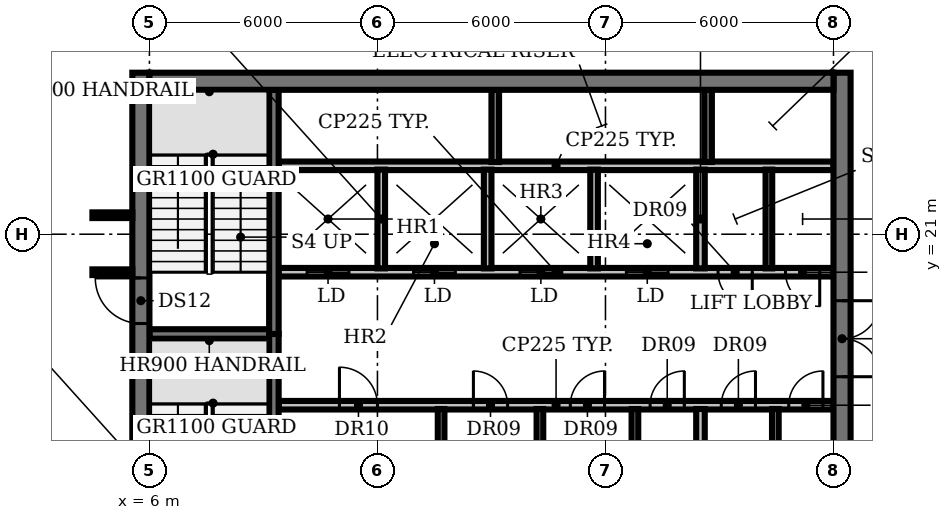
"""IFC4 building model, lengths in metres.
Left out: names, types, materials, properties, quantities, classifications, styles, units other than length and angle.
Written with IfcOpenShell. Run it as: python <this file> out.ifc"""

import sys

from ifc_helpers import new_model, si_unit, direction, frame, frame_2d, origin, place, context, subcontext, project, spatial, rectangle, extrude, element, fill, save


model = new_model("IFC4")
c1 = context("Model", 3, precision=1e-05, world=origin(), true_north=direction((0.0, 1.0)))
c2 = subcontext(c1, "Body", "Model", "MODEL_VIEW")
j1 = project(units=[si_unit("LENGTHUNIT", "METRE"), si_unit("PLANEANGLEUNIT", "RADIAN")], contexts=[c1])
p1 = place(None, origin())
s1 = spatial("IfcSite", under=j1, at=p1, CompositionType="ELEMENT")
p2 = place(p1, origin())
s2 = spatial("IfcBuilding", under=s1, at=p2, CompositionType="ELEMENT")
p3 = place(p2, frame((0.0, 0.0, 205.4)))
s3 = spatial("IfcBuildingStorey", under=s2, at=p3, CompositionType="ELEMENT", Elevation=205.4)
p4 = place(p3, frame((9.4, 16.5, 0.0), z_axis=(0.0, 0.0, 1.0), x_axis=(1.0, 0.0, 0.0)))
e1 = element("IfcWall", 1, at=p4, inside=s3, PredefinedType="PARTITIONING", context=c2, shape_type="SweptSolid", body=[
    extrude(rectangle(XDim=14.6, YDim=0.225, at=frame_2d((7.3, 0.0))), origin(), (0.0, 0.0, 1.0), 3.85),
])
p5 = place(p4, frame((1.6, 0.0, 0.0)))
e2 = element("IfcOpeningElement", 2, at=p5, cuts=e1, PredefinedType="OPENING", context=c2, shape_type="SweptSolid", body=[
    extrude(rectangle(XDim=1.0, YDim=2.1, at=frame_2d((0.5, 1.05))), frame((0.0, 0.123, 0.0), z_axis=(0.0, -1.0, 0.0), x_axis=(1.0, 0.0, 0.0)), (0.0, 0.0, 1.0), 0.245),
])
p6 = place(p4, frame((5.125, 0.0, 0.0)))
e3 = element("IfcOpeningElement", 3, at=p6, cuts=e1, PredefinedType="OPENING", context=c2, shape_type="SweptSolid", body=[
    extrude(rectangle(XDim=0.9, YDim=2.1, at=frame_2d((0.45, 1.05))), frame((0.0, 0.123, 0.0), z_axis=(0.0, -1.0, 0.0), x_axis=(1.0, 0.0, 0.0)), (0.0, 0.0, 1.0), 0.245),
])
p7 = place(p4, frame((7.675, 0.0, 0.0)))
e4 = element("IfcOpeningElement", 4, at=p7, cuts=e1, PredefinedType="OPENING", context=c2, shape_type="SweptSolid", body=[
    extrude(rectangle(XDim=0.9, YDim=2.1, at=frame_2d((0.45, 1.05))), frame((0.0, 0.123, 0.0), z_axis=(0.0, -1.0, 0.0), x_axis=(1.0, 0.0, 0.0)), (0.0, 0.0, 1.0), 0.245),
])
p8 = place(p4, frame((9.775, 0.0, 0.0)))
e5 = element("IfcOpeningElement", 5, at=p8, cuts=e1, PredefinedType="OPENING", context=c2, shape_type="SweptSolid", body=[
    extrude(rectangle(XDim=0.9, YDim=2.1, at=frame_2d((0.45, 1.05))), frame((0.0, 0.123, 0.0), z_axis=(0.0, -1.0, 0.0), x_axis=(1.0, 0.0, 0.0)), (0.0, 0.0, 1.0), 0.245),
])
p9 = place(p4, frame((11.647, 0.0, 0.0)))
e6 = element("IfcOpeningElement", 6, at=p9, cuts=e1, PredefinedType="OPENING", context=c2, shape_type="SweptSolid", body=[
    extrude(rectangle(XDim=0.9, YDim=2.1, at=frame_2d((0.45, 1.05))), frame((0.0, 0.123, 0.0), z_axis=(0.0, -1.0, 0.0), x_axis=(1.0, 0.0, 0.0)), (0.0, 0.0, 1.0), 0.245),
])
p10 = place(p4, frame((13.423, 0.0, 0.0)))
e7 = element("IfcOpeningElement", 7, at=p10, cuts=e1, PredefinedType="OPENING", context=c2, shape_type="SweptSolid", body=[
    extrude(rectangle(XDim=0.9, YDim=2.1, at=frame_2d((0.45, 1.05))), frame((0.0, 0.123, 0.0), z_axis=(0.0, -1.0, 0.0), x_axis=(1.0, 0.0, 0.0)), (0.0, 0.0, 1.0), 0.245),
])
p11 = place(p3, frame((6.0, 18.375, 0.0), z_axis=(0.0, 0.0, 1.0), x_axis=(1.0, 0.0, 0.0)))
e8 = element("IfcWall", 8, at=p11, inside=s3, PredefinedType="SHEAR", context=c2, shape_type="SweptSolid", body=[
    extrude(rectangle(XDim=3.15, YDim=0.25, at=frame_2d((1.575, 0.0))), origin(), (0.0, 0.0, 1.0), 3.85),
])
p12 = place(p3, frame((24.0, 20.0, 0.0), z_axis=(0.0, 0.0, 1.0), x_axis=(-1.0, 0.0, 0.0)))
e9 = element("IfcWall", 9, at=p12, inside=s3, PredefinedType="PARTITIONING", context=c2, shape_type="SweptSolid", body=[
    extrude(rectangle(XDim=14.6, YDim=0.225, at=frame_2d((7.3, 0.0))), origin(), (0.0, 0.0, 1.0), 3.85),
])
p13 = place(p12, frame((12.75, 0.0, 0.0)))
e10 = element("IfcOpeningElement", 10, at=p13, cuts=e9, PredefinedType="OPENING", context=c2, shape_type="SweptSolid", body=[
    extrude(rectangle(XDim=1.1, YDim=2.1, at=frame_2d((0.55, 1.05))), frame((0.0, 0.123, 0.0), z_axis=(0.0, -1.0, 0.0), x_axis=(1.0, 0.0, 0.0)), (0.0, 0.0, 1.0), 0.245),
])
p14 = place(p12, frame((9.95, 0.0, 0.0)))
e11 = element("IfcOpeningElement", 11, at=p14, cuts=e9, PredefinedType="OPENING", context=c2, shape_type="SweptSolid", body=[
    extrude(rectangle(XDim=1.1, YDim=2.1, at=frame_2d((0.55, 1.05))), frame((0.0, 0.123, 0.0), z_axis=(0.0, -1.0, 0.0), x_axis=(1.0, 0.0, 0.0)), (0.0, 0.0, 1.0), 0.245),
])
p15 = place(p12, frame((7.15, 0.0, 0.0)))
e12 = element("IfcOpeningElement", 12, at=p15, cuts=e9, PredefinedType="OPENING", context=c2, shape_type="SweptSolid", body=[
    extrude(rectangle(XDim=1.1, YDim=2.1, at=frame_2d((0.55, 1.05))), frame((0.0, 0.123, 0.0), z_axis=(0.0, -1.0, 0.0), x_axis=(1.0, 0.0, 0.0)), (0.0, 0.0, 1.0), 0.245),
])
p16 = place(p12, frame((4.35, 0.0, 0.0)))
e13 = element("IfcOpeningElement", 13, at=p16, cuts=e9, PredefinedType="OPENING", context=c2, shape_type="SweptSolid", body=[
    extrude(rectangle(XDim=1.1, YDim=2.1, at=frame_2d((0.55, 1.05))), frame((0.0, 0.123, 0.0), z_axis=(0.0, -1.0, 0.0), x_axis=(1.0, 0.0, 0.0)), (0.0, 0.0, 1.0), 0.245),
])
p17 = place(p12, frame((2.137, 0.0, 0.0)))
e14 = element("IfcOpeningElement", 14, at=p17, cuts=e9, PredefinedType="OPENING", context=c2, shape_type="SweptSolid", body=[
    extrude(rectangle(XDim=0.9, YDim=2.1, at=frame_2d((0.45, 1.05))), frame((0.0, 0.123, 0.0), z_axis=(0.0, -1.0, 0.0), x_axis=(1.0, 0.0, 0.0)), (0.0, 0.0, 1.0), 0.245),
])
p18 = place(p12, frame((0.363, 0.0, 0.0)))
e15 = element("IfcOpeningElement", 15, at=p18, cuts=e9, PredefinedType="OPENING", context=c2, shape_type="SweptSolid", body=[
    extrude(rectangle(XDim=0.9, YDim=2.1, at=frame_2d((0.45, 1.05))), frame((0.0, 0.123, 0.0), z_axis=(0.0, -1.0, 0.0), x_axis=(1.0, 0.0, 0.0)), (0.0, 0.0, 1.0), 0.245),
])
p19 = place(p3, frame((9.4, 22.8, 0.0), z_axis=(0.0, 0.0, 1.0), x_axis=(1.0, 0.0, 0.0)))
e16 = element("IfcWall", 16, at=p19, inside=s3, PredefinedType="PARTITIONING", context=c2, shape_type="SweptSolid", body=[
    extrude(rectangle(XDim=14.6, YDim=0.225, at=frame_2d((7.3, 0.0))), origin(), (0.0, 0.0, 1.0), 3.85),
])
p20 = place(p3, frame((9.275, 18.375, 0.0), z_axis=(0.0, 0.0, 1.0), x_axis=(0.0, -1.0, 0.0)))
e17 = element("IfcWall", 17, at=p20, inside=s3, PredefinedType="SHEAR", context=c2, shape_type="SweptSolid", body=[
    extrude(rectangle(XDim=6.55, YDim=0.25, at=frame_2d((3.275, 0.0))), origin(), (0.0, 0.0, 1.0), 3.85),
])
p21 = place(p20, frame((5.075, 0.0, 0.0)))
e18 = element("IfcOpeningElement", 18, at=p21, cuts=e17, PredefinedType="OPENING", context=c2, shape_type="SweptSolid", body=[
    extrude(rectangle(XDim=1.0, YDim=2.1, at=frame_2d((0.5, 1.05))), frame((0.0, 0.135, 0.0), z_axis=(0.0, -1.0, 0.0), x_axis=(1.0, 0.0, 0.0)), (0.0, 0.0, 1.0), 0.27),
])
p22 = place(p3, frame((9.275, 18.375, 0.0), z_axis=(0.0, 0.0, 1.0), x_axis=(0.0, 1.0, 0.0)))
e19 = element("IfcWall", 19, at=p22, inside=s3, PredefinedType="SHEAR", context=c2, shape_type="SweptSolid", body=[
    extrude(rectangle(XDim=6.425, YDim=0.25, at=frame_2d((3.212, 0.0))), origin(), (0.0, 0.0, 1.0), 3.85),
])
p23 = place(p3, frame((12.1, 20.1, 0.0), z_axis=(0.0, 0.0, 1.0), x_axis=(0.0, 1.0, 0.0)))
e20 = element("IfcWall", 20, at=p23, inside=s3, PredefinedType="SOLIDWALL", context=c2, shape_type="SweptSolid", body=[
    extrude(rectangle(XDim=2.6, YDim=0.2, at=frame_2d((1.3, 0.0))), origin(), (0.0, 0.0, 1.0), 3.85),
])
p24 = place(p3, frame((13.675, 13.8, 0.0), z_axis=(0.0, 0.0, 1.0), x_axis=(0.0, 1.0, 0.0)))
e21 = element("IfcWall", 21, at=p24, inside=s3, PredefinedType="PARTITIONING", context=c2, shape_type="SweptSolid", body=[
    extrude(rectangle(XDim=2.6, YDim=0.175, at=frame_2d((1.3, 0.0))), origin(), (0.0, 0.0, 1.0), 3.85),
])
p25 = place(p3, frame((14.9, 20.1, 0.0), z_axis=(0.0, 0.0, 1.0), x_axis=(0.0, 1.0, 0.0)))
e22 = element("IfcWall", 22, at=p25, inside=s3, PredefinedType="SOLIDWALL", context=c2, shape_type="SweptSolid", body=[
    extrude(rectangle(XDim=2.6, YDim=0.2, at=frame_2d((1.3, 0.0))), origin(), (0.0, 0.0, 1.0), 3.85),
])
p26 = place(p3, frame((15.1, 22.9, 0.0), z_axis=(0.0, 0.0, 1.0), x_axis=(0.0, 1.0, 0.0)))
e23 = element("IfcWall", 23, at=p26, inside=s3, PredefinedType="SHEAR", context=c2, shape_type="SweptSolid", body=[
    extrude(rectangle(XDim=1.9, YDim=0.2, at=frame_2d((0.95, 0.0))), origin(), (0.0, 0.0, 1.0), 3.85),
])
p27 = place(p3, frame((16.275, 13.8, 0.0), z_axis=(0.0, 0.0, 1.0), x_axis=(0.0, 1.0, 0.0)))
e24 = element("IfcWall", 24, at=p27, inside=s3, PredefinedType="PARTITIONING", context=c2, shape_type="SweptSolid", body=[
    extrude(rectangle(XDim=2.6, YDim=0.175, at=frame_2d((1.3, 0.0))), origin(), (0.0, 0.0, 1.0), 3.85),
])
p28 = place(p3, frame((17.7, 20.1, 0.0), z_axis=(0.0, 0.0, 1.0), x_axis=(0.0, 1.0, 0.0)))
e25 = element("IfcWall", 25, at=p28, inside=s3, PredefinedType="SOLIDWALL", context=c2, shape_type="SweptSolid", body=[
    extrude(rectangle(XDim=2.6, YDim=0.2, at=frame_2d((1.3, 0.0))), origin(), (0.0, 0.0, 1.0), 3.85),
])
p29 = place(p3, frame((18.775, 13.8, 0.0), z_axis=(0.0, 0.0, 1.0), x_axis=(0.0, 1.0, 0.0)))
e26 = element("IfcWall", 26, at=p29, inside=s3, PredefinedType="PARTITIONING", context=c2, shape_type="SweptSolid", body=[
    extrude(rectangle(XDim=2.6, YDim=0.175, at=frame_2d((1.3, 0.0))), origin(), (0.0, 0.0, 1.0), 3.85),
])
for number, where, z_axis, x_axis in (
    (27, (20.5, 13.8, 0.0), (0.0, 0.0, 1.0), (0.0, 1.0, 0.0)),
    (28, (20.5, 20.1, 0.0), (0.0, 0.0, 1.0), (0.0, 1.0, 0.0)),
):
    element("IfcWall", number, at=place(p3, frame(where, z_axis=z_axis, x_axis=x_axis)), inside=s3, PredefinedType="PARTITIONING", context=c2, shape_type="SweptSolid", body=[
        extrude(rectangle(XDim=2.6, YDim=0.225, at=frame_2d((1.3, 0.0))), origin(), (0.0, 0.0, 1.0), 3.85),
    ])
p30 = place(p3, frame((20.7, 22.9, 0.0), z_axis=(0.0, 0.0, 1.0), x_axis=(0.0, 1.0, 0.0)))
e29 = element("IfcWall", 29, at=p30, inside=s3, PredefinedType="SHEAR", context=c2, shape_type="SweptSolid", body=[
    extrude(rectangle(XDim=1.9, YDim=0.2, at=frame_2d((0.95, 0.0))), origin(), (0.0, 0.0, 1.0), 3.85),
])
for number, where, z_axis, x_axis in (
    (30, (22.3, 20.1, 0.0), (0.0, 0.0, 1.0), (0.0, 1.0, 0.0)),
    (31, (22.47, 13.8, 0.0), (0.0, 0.0, 1.0), (0.0, 1.0, 0.0)),
):
    element("IfcWall", number, at=place(p3, frame(where, z_axis=z_axis, x_axis=x_axis)), inside=s3, PredefinedType="PARTITIONING", context=c2, shape_type="SweptSolid", body=[
        extrude(rectangle(XDim=2.6, YDim=0.175, at=frame_2d((1.3, 0.0))), origin(), (0.0, 0.0, 1.0), 3.85),
    ])
p31 = place(p3, frame((5.775, 4.47, 0.0), z_axis=(0.0, 0.0, 1.0), x_axis=(0.0, 1.0, 0.0)))
e32 = element("IfcWall", 32, at=p31, inside=s3, PredefinedType="SHEAR", context=c2, shape_type="SweptSolid", body=[
    extrude(rectangle(XDim=20.78, YDim=0.45, at=frame_2d((10.39, 0.0))), origin(), (0.0, 0.0, 1.0), 3.85),
])
p32 = place(p31, frame((1.18, 0.0, 0.0)))
e33 = element("IfcOpeningElement", 33, at=p32, cuts=e32, PredefinedType="OPENING", context=c2, shape_type="SweptSolid", body=[
    extrude(rectangle(XDim=1.5, YDim=2.1, at=frame_2d((0.75, 1.05))), frame((0.0, 0.235, 0.0), z_axis=(0.0, -1.0, 0.0), x_axis=(1.0, 0.0, 0.0)), (0.0, 0.0, 1.0), 0.47),
])
p33 = place(p31, frame((7.63, 0.0, 0.0)))
e34 = element("IfcOpeningElement", 34, at=p33, cuts=e32, PredefinedType="OPENING", context=c2, shape_type="SweptSolid", body=[
    extrude(rectangle(XDim=1.2, YDim=2.1, at=frame_2d((0.6, 1.05))), frame((0.0, 0.235, 0.0), z_axis=(0.0, -1.0, 0.0), x_axis=(1.0, 0.0, 0.0)), (0.0, 0.0, 1.0), 0.47),
])
p34 = place(p31, frame((14.18, 0.0, 0.0)))
e35 = element("IfcOpeningElement", 35, at=p34, cuts=e32, PredefinedType="OPENING", context=c2, shape_type="SweptSolid", body=[
    extrude(rectangle(XDim=1.2, YDim=2.1, at=frame_2d((0.6, 1.05))), frame((0.0, 0.235, 0.0), z_axis=(0.0, -1.0, 0.0), x_axis=(1.0, 0.0, 0.0)), (0.0, 0.0, 1.0), 0.47),
])
p35 = place(p3, frame((24.225, 25.25, 0.0), z_axis=(0.0, 0.0, 1.0), x_axis=(0.0, -1.0, 0.0)))
e36 = element("IfcWall", 36, at=p35, inside=s3, PredefinedType="SHEAR", context=c2, shape_type="SweptSolid", body=[
    extrude(rectangle(XDim=20.78, YDim=0.45, at=frame_2d((10.39, 0.0))), origin(), (0.0, 0.0, 1.0), 3.85),
])
p36 = place(p35, frame((18.1, 0.0, 0.0)))
e37 = element("IfcOpeningElement", 37, at=p36, cuts=e36, PredefinedType="OPENING", context=c2, shape_type="SweptSolid", body=[
    extrude(rectangle(XDim=1.5, YDim=2.1, at=frame_2d((0.75, 1.05))), frame((0.0, 0.235, 0.0), z_axis=(0.0, -1.0, 0.0), x_axis=(1.0, 0.0, 0.0)), (0.0, 0.0, 1.0), 0.47),
])
p37 = place(p35, frame((12.0, 0.0, 0.0)))
e38 = element("IfcOpeningElement", 38, at=p37, cuts=e36, PredefinedType="OPENING", context=c2, shape_type="SweptSolid", body=[
    extrude(rectangle(XDim=0.9, YDim=2.1, at=frame_2d((0.45, 1.05))), frame((0.0, 0.235, 0.0), z_axis=(0.0, -1.0, 0.0), x_axis=(1.0, 0.0, 0.0)), (0.0, 0.0, 1.0), 0.47),
])
p38 = place(p35, frame((6.0, 0.0, 0.0)))
e39 = element("IfcOpeningElement", 39, at=p38, cuts=e36, PredefinedType="OPENING", context=c2, shape_type="SweptSolid", body=[
    extrude(rectangle(XDim=2.0, YDim=2.1, at=frame_2d((1.0, 1.05))), frame((0.0, 0.235, 0.0), z_axis=(0.0, -1.0, 0.0), x_axis=(1.0, 0.0, 0.0)), (0.0, 0.0, 1.0), 0.47),
])
p39 = place(p3, frame((6.0, 25.025, 0.0), z_axis=(0.0, 0.0, 1.0), x_axis=(1.0, 0.0, 0.0)))
e40 = element("IfcWall", 40, at=p39, inside=s3, PredefinedType="SHEAR", context=c2, shape_type="SweptSolid", body=[
    extrude(rectangle(XDim=18.0, YDim=0.45, at=frame_2d((9.0, 0.0))), origin(), (0.0, 0.0, 1.0), 3.85),
])
for number, where, z_axis, x_axis in (
    (41, (4.5, 20.0, 0.0), (0.0, 0.0, 1.0), (1.0, 0.0, 0.0)),
    (42, (4.5, 21.5, 0.0), (0.0, 0.0, 1.0), (1.0, 0.0, 0.0)),
):
    element("IfcWall", number, at=place(p3, frame(where, z_axis=z_axis, x_axis=x_axis)), inside=s3, PredefinedType="PARTITIONING", context=c2, shape_type="SweptSolid", body=[
        extrude(rectangle(XDim=1.05, YDim=0.15, at=frame_2d((0.525, 0.0))), origin(), (0.0, 0.0, 1.0), 2.88),
    ])
p40 = place(p5, origin())
e43 = element("IfcDoor", 43, at=p40, inside=s3, OperationType="SINGLE_SWING_LEFT", PredefinedType="DOOR", context=c2, shape_type="SweptSolid", body=[
    extrude(rectangle(XDim=1.0, YDim=2.1, at=frame_2d((0.5, 1.05))), frame((0.0, 0.025, 0.0), z_axis=(0.0, -1.0, 0.0), x_axis=(1.0, 0.0, 0.0)), (0.0, 0.0, 1.0), 0.05),
])
fill(e2, e43)
p41 = place(p6, origin())
e44 = element("IfcDoor", 44, at=p41, inside=s3, OperationType="SINGLE_SWING_LEFT", PredefinedType="DOOR", context=c2, shape_type="SweptSolid", body=[
    extrude(rectangle(XDim=0.9, YDim=2.1, at=frame_2d((0.45, 1.05))), frame((0.0, 0.025, 0.0), z_axis=(0.0, -1.0, 0.0), x_axis=(1.0, 0.0, 0.0)), (0.0, 0.0, 1.0), 0.05),
])
fill(e3, e44)
p42 = place(p7, origin())
e45 = element("IfcDoor", 45, at=p42, inside=s3, OperationType="SINGLE_SWING_RIGHT", PredefinedType="DOOR", context=c2, shape_type="SweptSolid", body=[
    extrude(rectangle(XDim=0.9, YDim=2.1, at=frame_2d((0.45, 1.05))), frame((0.0, 0.025, 0.0), z_axis=(0.0, -1.0, 0.0), x_axis=(1.0, 0.0, 0.0)), (0.0, 0.0, 1.0), 0.05),
])
fill(e4, e45)
p43 = place(p8, origin())
e46 = element("IfcDoor", 46, at=p43, inside=s3, OperationType="SINGLE_SWING_RIGHT", PredefinedType="DOOR", context=c2, shape_type="SweptSolid", body=[
    extrude(rectangle(XDim=0.9, YDim=2.1, at=frame_2d((0.45, 1.05))), frame((0.0, 0.025, 0.0), z_axis=(0.0, -1.0, 0.0), x_axis=(1.0, 0.0, 0.0)), (0.0, 0.0, 1.0), 0.05),
])
fill(e5, e46)
p44 = place(p9, origin())
e47 = element("IfcDoor", 47, at=p44, inside=s3, OperationType="SINGLE_SWING_RIGHT", PredefinedType="DOOR", context=c2, shape_type="SweptSolid", body=[
    extrude(rectangle(XDim=0.9, YDim=2.1, at=frame_2d((0.45, 1.05))), frame((0.0, 0.025, 0.0), z_axis=(0.0, -1.0, 0.0), x_axis=(1.0, 0.0, 0.0)), (0.0, 0.0, 1.0), 0.05),
])
fill(e6, e47)
p45 = place(p10, origin())
e48 = element("IfcDoor", 48, at=p45, inside=s3, OperationType="SINGLE_SWING_RIGHT", PredefinedType="DOOR", context=c2, shape_type="SweptSolid", body=[
    extrude(rectangle(XDim=0.9, YDim=2.1, at=frame_2d((0.45, 1.05))), frame((0.0, 0.025, 0.0), z_axis=(0.0, -1.0, 0.0), x_axis=(1.0, 0.0, 0.0)), (0.0, 0.0, 1.0), 0.05),
])
fill(e7, e48)
p46 = place(p13, origin())
e49 = element("IfcDoor", 49, at=p46, inside=s3, OperationType="DOUBLE_DOOR_SLIDING", PredefinedType="DOOR", context=c2, shape_type="SweptSolid", body=[
    extrude(rectangle(XDim=1.1, YDim=2.1, at=frame_2d((0.55, 1.05))), frame((0.0, 0.025, 0.0), z_axis=(0.0, -1.0, 0.0), x_axis=(1.0, 0.0, 0.0)), (0.0, 0.0, 1.0), 0.05),
])
fill(e10, e49)
p47 = place(p14, origin())
e50 = element("IfcDoor", 50, at=p47, inside=s3, OperationType="DOUBLE_DOOR_SLIDING", PredefinedType="DOOR", context=c2, shape_type="SweptSolid", body=[
    extrude(rectangle(XDim=1.1, YDim=2.1, at=frame_2d((0.55, 1.05))), frame((0.0, 0.025, 0.0), z_axis=(0.0, -1.0, 0.0), x_axis=(1.0, 0.0, 0.0)), (0.0, 0.0, 1.0), 0.05),
])
fill(e11, e50)
p48 = place(p15, origin())
e51 = element("IfcDoor", 51, at=p48, inside=s3, OperationType="DOUBLE_DOOR_SLIDING", PredefinedType="DOOR", context=c2, shape_type="SweptSolid", body=[
    extrude(rectangle(XDim=1.1, YDim=2.1, at=frame_2d((0.55, 1.05))), frame((0.0, 0.025, 0.0), z_axis=(0.0, -1.0, 0.0), x_axis=(1.0, 0.0, 0.0)), (0.0, 0.0, 1.0), 0.05),
])
fill(e12, e51)
p49 = place(p16, origin())
e52 = element("IfcDoor", 52, at=p49, inside=s3, OperationType="DOUBLE_DOOR_SLIDING", PredefinedType="DOOR", context=c2, shape_type="SweptSolid", body=[
    extrude(rectangle(XDim=1.1, YDim=2.1, at=frame_2d((0.55, 1.05))), frame((0.0, 0.025, 0.0), z_axis=(0.0, -1.0, 0.0), x_axis=(1.0, 0.0, 0.0)), (0.0, 0.0, 1.0), 0.05),
])
fill(e13, e52)
p50 = place(p17, origin())
e53 = element("IfcDoor", 53, at=p50, inside=s3, OperationType="SINGLE_SWING_LEFT", PredefinedType="DOOR", context=c2, shape_type="SweptSolid", body=[
    extrude(rectangle(XDim=0.9, YDim=2.1, at=frame_2d((0.45, 1.05))), frame((0.0, 0.025, 0.0), z_axis=(0.0, -1.0, 0.0), x_axis=(1.0, 0.0, 0.0)), (0.0, 0.0, 1.0), 0.05),
])
fill(e14, e53)
p51 = place(p18, origin())
e54 = element("IfcDoor", 54, at=p51, inside=s3, OperationType="SINGLE_SWING_LEFT", PredefinedType="DOOR", context=c2, shape_type="SweptSolid", body=[
    extrude(rectangle(XDim=0.9, YDim=2.1, at=frame_2d((0.45, 1.05))), frame((0.0, 0.025, 0.0), z_axis=(0.0, -1.0, 0.0), x_axis=(1.0, 0.0, 0.0)), (0.0, 0.0, 1.0), 0.05),
])
fill(e15, e54)
p52 = place(p34, origin())
e55 = element("IfcDoor", 55, at=p52, inside=s3, OperationType="SINGLE_SWING_RIGHT", PredefinedType="DOOR", context=c2, shape_type="SweptSolid", body=[
    extrude(rectangle(XDim=1.2, YDim=2.1, at=frame_2d((0.6, 1.05))), frame((0.0, 0.025, 0.0), z_axis=(0.0, -1.0, 0.0), x_axis=(1.0, 0.0, 0.0)), (0.0, 0.0, 1.0), 0.05),
])
fill(e35, e55)
p53 = place(p38, origin())
e56 = element("IfcDoor", 56, at=p53, inside=s3, OperationType="DOUBLE_DOOR_SINGLE_SWING", PredefinedType="DOOR", context=c2, shape_type="SweptSolid", body=[
    extrude(rectangle(XDim=2.0, YDim=2.1, at=frame_2d((1.0, 1.05))), frame((0.0, 0.025, 0.0), z_axis=(0.0, -1.0, 0.0), x_axis=(1.0, 0.0, 0.0)), (0.0, 0.0, 1.0), 0.05),
])
fill(e39, e56)
save(model, sys.argv[1])
